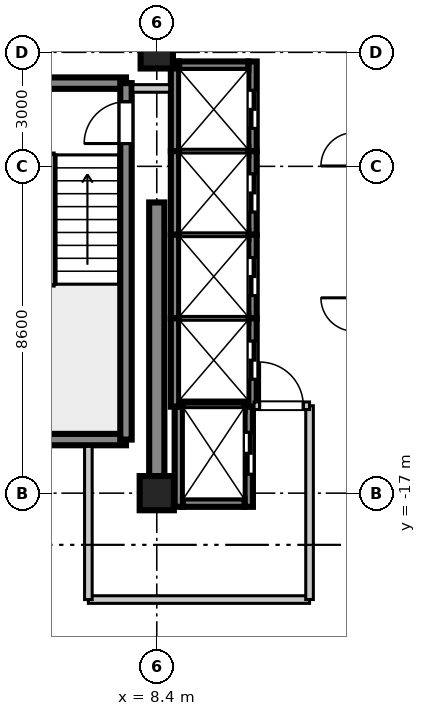
"""IFC4 building model, lengths in metres.
Left out: names, types, materials, properties, quantities, classifications, styles, units other than length and angle.
Written with IfcOpenShell. Run it as: python <this file> out.ifc"""

import sys

from ifc_helpers import new_model, si_unit, direction, frame, frame_2d, origin, origin_2d, place, context, subcontext, project, spatial, rectangle, extrude, source, transform, mapped, element, fill, save


model = new_model("IFC4")
c1 = context("Model", 3, precision=1e-05, world=origin(), true_north=direction((0.0, 1.0)))
c2 = subcontext(c1, "Body", "Model", "MODEL_VIEW")
j1 = project(units=[si_unit("LENGTHUNIT", "METRE"), si_unit("PLANEANGLEUNIT", "RADIAN")], contexts=[c1])
p1 = place(None, origin())
s1 = spatial("IfcSite", under=j1, at=p1, CompositionType="ELEMENT")
p2 = place(p1, origin())
s2 = spatial("IfcBuilding", under=s1, at=p2, CompositionType="ELEMENT")
p3 = place(p2, frame((0.0, 0.0, 311.9)))
s3 = spatial("IfcBuildingStorey", under=s2, at=p3, CompositionType="ELEMENT", Elevation=311.9)
m1 = source(origin(), c2, "Body", "SweptSolid", [
    extrude(rectangle(XDim=0.9, YDim=0.9, at=origin_2d()), origin(), (0.0, 0.0, 1.0), 3.805),
])
p4 = place(p3, frame((8.4, -17.0, 0.0), z_axis=(0.0, 0.0, 1.0), x_axis=(1.0, 0.0, 0.0)))
e1 = element("IfcColumn", 1, at=p4, inside=s3, PredefinedType="COLUMN", context=c2, shape_type="MappedRepresentation", body=[
    mapped(m1, transform((0.0, 0.0, 0.0), scale=1.0)),
])
m2 = source(origin(), c2, "Body", "SweptSolid", [
    extrude(rectangle(XDim=0.85, YDim=0.85, at=origin_2d()), origin(), (0.0, 0.0, 1.0), 3.805),
])
p5 = place(p3, frame((8.4, -5.4, 0.0), z_axis=(0.0, 0.0, 1.0), x_axis=(1.0, 0.0, 0.0)))
e2 = element("IfcColumn", 2, at=p5, inside=s3, PredefinedType="PILASTER", context=c2, shape_type="MappedRepresentation", body=[
    mapped(m2, transform((0.0, 0.0, 0.0), scale=1.0)),
])
m3 = source(origin(), c2, "Body", "SweptSolid", [
    extrude(rectangle(XDim=7.65, YDim=0.4, at=frame_2d((3.825, 0.0))), origin(), (0.0, 0.0, 1.0), 3.55),
])
p6 = place(p3, frame((8.4, -17.0, 0.0), z_axis=(0.0, 0.0, 1.0), x_axis=(0.0, 1.0, 0.0)))
e3 = element("IfcWall", 3, at=p6, inside=s3, PredefinedType="SHEAR", context=c2, shape_type="MappedRepresentation", body=[
    mapped(m3, transform((0.0, 0.0, 0.0), scale=1.0)),
])
m4 = source(origin(), c2, "Body", "SweptSolid", [
    extrude(rectangle(XDim=3.98, YDim=0.3, at=frame_2d((1.99, 0.0))), origin(), (0.0, 0.0, 1.0), 3.55),
])
for number, where, z_axis, x_axis in (
    (4, (3.61, -15.59, 0.0), (0.0, 0.0, 1.0), (1.0, 0.0, 0.0)),
    (5, (3.61, -6.21, 0.0), (0.0, 0.0, 1.0), (1.0, 0.0, 0.0)),
):
    element("IfcWall", number, at=place(p3, frame(where, z_axis=z_axis, x_axis=x_axis)), inside=s3, PredefinedType="SHEAR", context=c2, shape_type="MappedRepresentation", body=[
        mapped(m4, transform((0.0, 0.0, 0.0), scale=1.0)),
    ])
m5 = source(origin(), c2, "Body", "SweptSolid", [
    extrude(rectangle(XDim=9.38, YDim=0.3, at=frame_2d((4.69, 0.0))), origin(), (0.0, 0.0, 1.0), 3.55),
])
p7 = place(p3, frame((7.59, -15.59, 0.0), z_axis=(0.0, 0.0, 1.0), x_axis=(0.0, 1.0, 0.0)))
e6 = element("IfcWall", 6, at=p7, inside=s3, PredefinedType="SHEAR", context=c2, shape_type="MappedRepresentation", body=[
    mapped(m5, transform((0.0, 0.0, 0.0), scale=1.0)),
])
p8 = place(p7, frame((7.79, 0.0, 0.0)))
e7 = element("IfcOpeningElement", 7, at=p8, cuts=e6, PredefinedType="OPENING", context=c2, shape_type="SweptSolid", body=[
    extrude(rectangle(XDim=1.1, YDim=2.15, at=frame_2d((0.55, 1.075))), frame((0.0, 0.16, 0.0), z_axis=(0.0, -1.0, 0.0), x_axis=(1.0, 0.0, 0.0)), (0.0, 0.0, 1.0), 0.32),
])
m6 = source(origin(), c2, "Body", "SweptSolid", [
    extrude(rectangle(XDim=2.36, YDim=0.22, at=frame_2d((1.18, 0.0))), origin(), (0.0, 0.0, 1.0), 3.55),
])
p9 = place(p3, frame((8.88, -8.0, 0.0), z_axis=(0.0, 0.0, 1.0), x_axis=(0.0, 1.0, 0.0)))
e8 = element("IfcWall", 8, at=p9, inside=s3, PredefinedType="SHEAR", context=c2, shape_type="MappedRepresentation", body=[
    mapped(m6, transform((0.0, 0.0, 0.0), scale=1.0)),
])
p10 = place(p3, frame((10.92, -8.0, 0.0), z_axis=(0.0, 0.0, 1.0), x_axis=(0.0, 1.0, 0.0)))
e9 = element("IfcWall", 9, at=p10, inside=s3, PredefinedType="SHEAR", context=c2, shape_type="MappedRepresentation", body=[
    mapped(m6, transform((0.0, 0.0, 0.0), scale=1.0)),
])
p11 = place(p10, frame((0.6, 0.0, 0.0)))
e10 = element("IfcOpeningElement", 10, at=p11, cuts=e9, PredefinedType="OPENING", context=c2, shape_type="SweptSolid", body=[
    extrude(rectangle(XDim=1.0, YDim=2.2, at=frame_2d((0.5, 1.1))), frame((0.0, 0.12, 0.0), z_axis=(0.0, -1.0, 0.0), x_axis=(1.0, 0.0, 0.0)), (0.0, 0.0, 1.0), 0.24),
])
m7 = source(origin(), c2, "Body", "SweptSolid", [
    extrude(rectangle(XDim=1.82, YDim=0.22, at=frame_2d((0.91, 0.0))), origin(), (0.0, 0.0, 1.0), 3.55),
])
p12 = place(p3, frame((8.99, -5.75, 0.0), z_axis=(0.0, 0.0, 1.0), x_axis=(1.0, 0.0, 0.0)))
e11 = element("IfcWall", 11, at=p12, inside=s3, PredefinedType="SHEAR", context=c2, shape_type="MappedRepresentation", body=[
    mapped(m7, transform((0.0, 0.0, 0.0), scale=1.0)),
])
m8 = source(origin(), c2, "Body", "SweptSolid", [
    extrude(rectangle(XDim=2.2, YDim=0.22, at=frame_2d((1.1, 0.0))), origin(), (0.0, 0.0, 1.0), 3.55),
])
p13 = place(p3, frame((8.88, -10.2, 0.0), z_axis=(0.0, 0.0, 1.0), x_axis=(0.0, 1.0, 0.0)))
e12 = element("IfcWall", 12, at=p13, inside=s3, PredefinedType="SHEAR", context=c2, shape_type="MappedRepresentation", body=[
    mapped(m8, transform((0.0, 0.0, 0.0), scale=1.0)),
])
p14 = place(p3, frame((10.92, -10.2, 0.0), z_axis=(0.0, 0.0, 1.0), x_axis=(0.0, 1.0, 0.0)))
e13 = element("IfcWall", 13, at=p14, inside=s3, PredefinedType="SHEAR", context=c2, shape_type="MappedRepresentation", body=[
    mapped(m8, transform((0.0, 0.0, 0.0), scale=1.0)),
])
p15 = place(p14, frame((0.6, 0.0, 0.0)))
e14 = element("IfcOpeningElement", 14, at=p15, cuts=e13, PredefinedType="OPENING", context=c2, shape_type="SweptSolid", body=[
    extrude(rectangle(XDim=1.0, YDim=2.2, at=frame_2d((0.5, 1.1))), frame((0.0, 0.12, 0.0), z_axis=(0.0, -1.0, 0.0), x_axis=(1.0, 0.0, 0.0)), (0.0, 0.0, 1.0), 0.24),
])
m9 = source(origin(), c2, "Body", "SweptSolid", [
    extrude(rectangle(XDim=1.82, YDim=0.22, at=frame_2d((0.91, 0.0))), origin(), (0.0, 0.0, 1.0), 3.85),
])
p16 = place(p3, frame((8.99, -8.0, 0.0), z_axis=(0.0, 0.0, 1.0), x_axis=(1.0, 0.0, 0.0)))
e15 = element("IfcWall", 15, at=p16, inside=s3, PredefinedType="SHEAR", context=c2, shape_type="MappedRepresentation", body=[
    mapped(m9, transform((0.0, 0.0, 0.0), scale=1.0)),
])
p17 = place(p3, frame((8.88, -12.4, 0.0), z_axis=(0.0, 0.0, 1.0), x_axis=(0.0, 1.0, 0.0)))
e16 = element("IfcWall", 16, at=p17, inside=s3, PredefinedType="SHEAR", context=c2, shape_type="MappedRepresentation", body=[
    mapped(m8, transform((0.0, 0.0, 0.0), scale=1.0)),
])
p18 = place(p3, frame((10.92, -12.4, 0.0), z_axis=(0.0, 0.0, 1.0), x_axis=(0.0, 1.0, 0.0)))
e17 = element("IfcWall", 17, at=p18, inside=s3, PredefinedType="SHEAR", context=c2, shape_type="MappedRepresentation", body=[
    mapped(m8, transform((0.0, 0.0, 0.0), scale=1.0)),
])
p19 = place(p18, frame((0.6, 0.0, 0.0)))
e18 = element("IfcOpeningElement", 18, at=p19, cuts=e17, PredefinedType="OPENING", context=c2, shape_type="SweptSolid", body=[
    extrude(rectangle(XDim=1.0, YDim=2.2, at=frame_2d((0.5, 1.1))), frame((0.0, 0.12, 0.0), z_axis=(0.0, -1.0, 0.0), x_axis=(1.0, 0.0, 0.0)), (0.0, 0.0, 1.0), 0.24),
])
p20 = place(p3, frame((8.99, -10.2, 0.0), z_axis=(0.0, 0.0, 1.0), x_axis=(1.0, 0.0, 0.0)))
e19 = element("IfcWall", 19, at=p20, inside=s3, PredefinedType="SHEAR", context=c2, shape_type="MappedRepresentation", body=[
    mapped(m9, transform((0.0, 0.0, 0.0), scale=1.0)),
])
m10 = source(origin(), c2, "Body", "SweptSolid", [
    extrude(rectangle(XDim=2.325, YDim=0.22, at=frame_2d((1.163, 0.0))), origin(), (0.0, 0.0, 1.0), 3.55),
])
p21 = place(p3, frame((8.88, -14.725, 0.0), z_axis=(0.0, 0.0, 1.0), x_axis=(0.0, 1.0, 0.0)))
e20 = element("IfcWall", 20, at=p21, inside=s3, PredefinedType="SHEAR", context=c2, shape_type="MappedRepresentation", body=[
    mapped(m10, transform((0.0, 0.0, 0.0), scale=1.0)),
])
p22 = place(p3, frame((10.92, -14.725, 0.0), z_axis=(0.0, 0.0, 1.0), x_axis=(0.0, 1.0, 0.0)))
e21 = element("IfcWall", 21, at=p22, inside=s3, PredefinedType="SHEAR", context=c2, shape_type="MappedRepresentation", body=[
    mapped(m10, transform((0.0, 0.0, 0.0), scale=1.0)),
])
p23 = place(p22, frame((0.725, 0.0, 0.0)))
e22 = element("IfcOpeningElement", 22, at=p23, cuts=e21, PredefinedType="OPENING", context=c2, shape_type="SweptSolid", body=[
    extrude(rectangle(XDim=1.0, YDim=2.2, at=frame_2d((0.5, 1.1))), frame((0.0, 0.12, 0.0), z_axis=(0.0, -1.0, 0.0), x_axis=(1.0, 0.0, 0.0)), (0.0, 0.0, 1.0), 0.24),
])
p24 = place(p3, frame((8.99, -12.4, 0.0), z_axis=(0.0, 0.0, 1.0), x_axis=(1.0, 0.0, 0.0)))
e23 = element("IfcWall", 23, at=p24, inside=s3, PredefinedType="SHEAR", context=c2, shape_type="MappedRepresentation", body=[
    mapped(m9, transform((0.0, 0.0, 0.0), scale=1.0)),
])
m11 = source(origin(), c2, "Body", "SweptSolid", [
    extrude(rectangle(XDim=2.635, YDim=0.22, at=frame_2d((1.317, 0.0))), origin(), (0.0, 0.0, 1.0), 3.55),
])
p25 = place(p3, frame((8.98, -17.36, 0.0), z_axis=(0.0, 0.0, 1.0), x_axis=(0.0, 1.0, 0.0)))
e24 = element("IfcWall", 24, at=p25, inside=s3, PredefinedType="SHEAR", context=c2, shape_type="MappedRepresentation", body=[
    mapped(m11, transform((0.0, 0.0, 0.0), scale=1.0)),
])
p26 = place(p3, frame((10.82, -17.36, 0.0), z_axis=(0.0, 0.0, 1.0), x_axis=(0.0, 1.0, 0.0)))
e25 = element("IfcWall", 25, at=p26, inside=s3, PredefinedType="SHEAR", context=c2, shape_type="MappedRepresentation", body=[
    mapped(m11, transform((0.0, 0.0, 0.0), scale=1.0)),
])
p27 = place(p26, frame((0.86, 0.0, 0.0)))
e26 = element("IfcOpeningElement", 26, at=p27, cuts=e25, PredefinedType="OPENING", context=c2, shape_type="SweptSolid", body=[
    extrude(rectangle(XDim=1.1, YDim=2.2, at=frame_2d((0.55, 1.1))), frame((0.0, 0.12, 0.0), z_axis=(0.0, -1.0, 0.0), x_axis=(1.0, 0.0, 0.0)), (0.0, 0.0, 1.0), 0.24),
])
m12 = source(origin(), c2, "Body", "SweptSolid", [
    extrude(rectangle(XDim=1.62, YDim=0.22, at=frame_2d((0.81, 0.0))), origin(), (0.0, 0.0, 1.0), 3.55),
])
p28 = place(p3, frame((9.09, -17.25, 0.0), z_axis=(0.0, 0.0, 1.0), x_axis=(1.0, 0.0, 0.0)))
e27 = element("IfcWall", 27, at=p28, inside=s3, PredefinedType="SHEAR", context=c2, shape_type="MappedRepresentation", body=[
    mapped(m12, transform((0.0, 0.0, 0.0), scale=1.0)),
])
m13 = source(origin(), c2, "Body", "SweptSolid", [
    extrude(rectangle(XDim=1.62, YDim=0.22, at=frame_2d((0.81, 0.0))), origin(), (0.0, 0.0, 1.0), 3.85),
])
p29 = place(p3, frame((9.09, -14.725, 0.0), z_axis=(0.0, 0.0, 1.0), x_axis=(1.0, 0.0, 0.0)))
e28 = element("IfcWall", 28, at=p29, inside=s3, PredefinedType="SHEAR", context=c2, shape_type="MappedRepresentation", body=[
    mapped(m13, transform((0.0, 0.0, 0.0), scale=1.0)),
])
m14 = source(origin(), c2, "Body", "SweptSolid", [
    extrude(rectangle(XDim=5.82, YDim=0.2, at=frame_2d((2.91, 0.0))), origin(), (0.0, 0.0, 1.0), 2.89),
])
p30 = place(p3, frame((6.6, -19.8, 0.0), z_axis=(0.0, 0.0, 1.0), x_axis=(1.0, 0.0, 0.0)))
e29 = element("IfcWall", 29, at=p30, inside=s3, PredefinedType="PARTITIONING", context=c2, shape_type="MappedRepresentation", body=[
    mapped(m14, transform((0.0, 0.0, 0.0), scale=1.0)),
])
m15 = source(origin(), c2, "Body", "SweptSolid", [
    extrude(rectangle(XDim=4.03, YDim=0.2, at=frame_2d((2.015, 0.0))), origin(), (0.0, 0.0, 1.0), 2.89),
])
p31 = place(p3, frame((6.6, -19.8, 0.0), z_axis=(0.0, 0.0, 1.0), x_axis=(0.0, 1.0, 0.0)))
e30 = element("IfcWall", 30, at=p31, inside=s3, PredefinedType="PARTITIONING", context=c2, shape_type="MappedRepresentation", body=[
    mapped(m15, transform((0.0, 0.0, 0.0), scale=1.0)),
])
m16 = source(origin(), c2, "Body", "SweptSolid", [
    extrude(rectangle(XDim=5.1, YDim=0.2, at=frame_2d((2.55, 0.0))), origin(), (0.0, 0.0, 1.0), 2.89),
])
p32 = place(p3, frame((12.42, -19.8, 0.0), z_axis=(0.0, 0.0, 1.0), x_axis=(0.0, 1.0, 0.0)))
e31 = element("IfcWall", 31, at=p32, inside=s3, PredefinedType="PARTITIONING", context=c2, shape_type="MappedRepresentation", body=[
    mapped(m16, transform((0.0, 0.0, 0.0), scale=1.0)),
])
m17 = source(origin(), c2, "Body", "SweptSolid", [
    extrude(rectangle(XDim=1.46, YDim=0.2, at=frame_2d((0.73, 0.0))), origin(), (0.0, 0.0, 1.0), 2.89),
])
p33 = place(p3, frame((10.96, -14.7, 0.0), z_axis=(0.0, 0.0, 1.0), x_axis=(1.0, 0.0, 0.0)))
e32 = element("IfcWall", 32, at=p33, inside=s3, PredefinedType="PARTITIONING", context=c2, shape_type="MappedRepresentation", body=[
    mapped(m17, transform((0.0, 0.0, 0.0), scale=1.0)),
])
p34 = place(p33, frame((0.145, 0.0, 0.0)))
e33 = element("IfcOpeningElement", 33, at=p34, cuts=e32, PredefinedType="OPENING", context=c2, shape_type="SweptSolid", body=[
    extrude(rectangle(XDim=1.15, YDim=2.15, at=frame_2d((0.575, 1.075))), frame((0.0, 0.11, 0.0), z_axis=(0.0, -1.0, 0.0), x_axis=(1.0, 0.0, 0.0)), (0.0, 0.0, 1.0), 0.22),
])
m18 = source(origin(), c2, "Body", "SweptSolid", [
    extrude(rectangle(XDim=0.97, YDim=0.2, at=frame_2d((0.485, 0.0))), origin(), (0.0, 0.0, 1.0), 2.89),
])
p35 = place(p3, frame((7.77, -6.35, 0.0), z_axis=(0.0, 0.0, 1.0), x_axis=(1.0, 0.0, 0.0)))
e34 = element("IfcWall", 34, at=p35, inside=s3, PredefinedType="PARTITIONING", context=c2, shape_type="MappedRepresentation", body=[
    mapped(m18, transform((0.0, 0.0, 0.0), scale=1.0)),
])
m19 = source(origin(), c2, "Body", "SweptSolid", [
    extrude(rectangle(XDim=1.1, YDim=2.15, at=frame_2d((0.55, 1.075))), frame((0.0, 0.025, 0.0), z_axis=(0.0, -1.0, 0.0), x_axis=(1.0, 0.0, 0.0)), (0.0, 0.0, 1.0), 0.05),
])
p36 = place(p8, origin())
e35 = element("IfcDoor", 35, at=p36, inside=s3, OperationType="SINGLE_SWING_LEFT", PredefinedType="DOOR", context=c2, shape_type="MappedRepresentation", body=[
    mapped(m19, transform((0.0, 0.0, 0.0), scale=1.0)),
])
fill(e7, e35)
m20 = source(origin(), c2, "Body", "SweptSolid", [
    extrude(rectangle(XDim=1.0, YDim=2.2, at=frame_2d((0.5, 1.1))), frame((0.0, 0.025, 0.0), z_axis=(0.0, -1.0, 0.0), x_axis=(1.0, 0.0, 0.0)), (0.0, 0.0, 1.0), 0.05),
])
p37 = place(p11, frame((1.0, 0.0, 0.0), z_axis=(0.0, 0.0, 1.0), x_axis=(-1.0, 0.0, 0.0)))
e36 = element("IfcDoor", 36, at=p37, inside=s3, OperationType="DOUBLE_DOOR_SLIDING", PredefinedType="DOOR", context=c2, shape_type="MappedRepresentation", body=[
    mapped(m20, transform((0.0, 0.0, 0.0), scale=1.0)),
])
fill(e10, e36)
p38 = place(p15, frame((1.0, 0.0, 0.0), z_axis=(0.0, 0.0, 1.0), x_axis=(-1.0, 0.0, 0.0)))
e37 = element("IfcDoor", 37, at=p38, inside=s3, OperationType="DOUBLE_DOOR_SLIDING", PredefinedType="DOOR", context=c2, shape_type="MappedRepresentation", body=[
    mapped(m20, transform((0.0, 0.0, 0.0), scale=1.0)),
])
fill(e14, e37)
p39 = place(p19, frame((1.0, 0.0, 0.0), z_axis=(0.0, 0.0, 1.0), x_axis=(-1.0, 0.0, 0.0)))
e38 = element("IfcDoor", 38, at=p39, inside=s3, OperationType="DOUBLE_DOOR_SLIDING", PredefinedType="DOOR", context=c2, shape_type="MappedRepresentation", body=[
    mapped(m20, transform((0.0, 0.0, 0.0), scale=1.0)),
])
fill(e18, e38)
p40 = place(p23, frame((1.0, 0.0, 0.0), z_axis=(0.0, 0.0, 1.0), x_axis=(-1.0, 0.0, 0.0)))
e39 = element("IfcDoor", 39, at=p40, inside=s3, OperationType="DOUBLE_DOOR_SLIDING", PredefinedType="DOOR", context=c2, shape_type="MappedRepresentation", body=[
    mapped(m20, transform((0.0, 0.0, 0.0), scale=1.0)),
])
fill(e22, e39)
m21 = source(origin(), c2, "Body", "SweptSolid", [
    extrude(rectangle(XDim=1.1, YDim=2.2, at=frame_2d((0.55, 1.1))), frame((0.0, 0.025, 0.0), z_axis=(0.0, -1.0, 0.0), x_axis=(1.0, 0.0, 0.0)), (0.0, 0.0, 1.0), 0.05),
])
p41 = place(p27, frame((1.1, 0.0, 0.0), z_axis=(0.0, 0.0, 1.0), x_axis=(-1.0, 0.0, 0.0)))
e40 = element("IfcDoor", 40, at=p41, inside=s3, OperationType="DOUBLE_DOOR_SLIDING", PredefinedType="DOOR", context=c2, shape_type="MappedRepresentation", body=[
    mapped(m21, transform((0.0, 0.0, 0.0), scale=1.0)),
])
fill(e26, e40)
m22 = source(origin(), c2, "Body", "SweptSolid", [
    extrude(rectangle(XDim=1.15, YDim=2.15, at=frame_2d((0.575, 1.075))), frame((0.0, 0.025, 0.0), z_axis=(0.0, -1.0, 0.0), x_axis=(1.0, 0.0, 0.0)), (0.0, 0.0, 1.0), 0.05),
])
p42 = place(p34, origin())
e41 = element("IfcDoor", 41, at=p42, inside=s3, OperationType="SINGLE_SWING_LEFT", PredefinedType="DOOR", context=c2, shape_type="MappedRepresentation", body=[
    mapped(m22, transform((0.0, 0.0, 0.0), scale=1.0)),
])
fill(e33, e41)
save(model, sys.argv[1])
